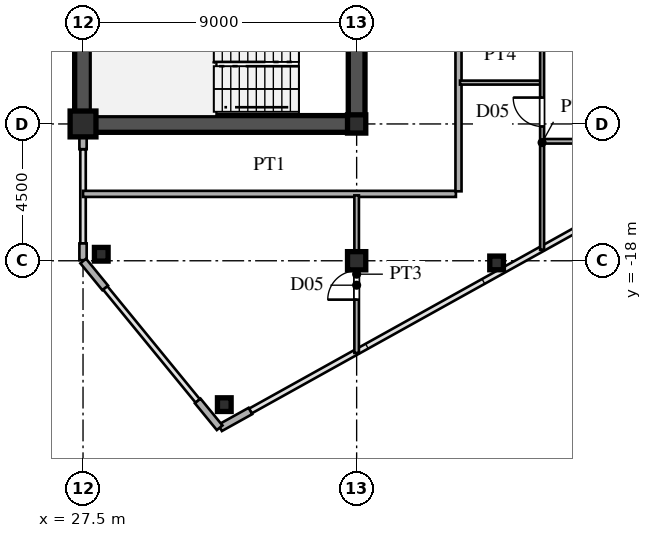
"""IFC4 building model, lengths in metres.
Left out: names, types, materials, properties, quantities, classifications, styles, units other than length and angle.
Written with IfcOpenShell. Run it as: python <this file> out.ifc"""

import sys

from ifc_helpers import new_model, si_unit, direction, frame, frame_2d, origin, origin_2d, place, context, subcontext, project, spatial, rectangle, hollow_rectangle, i_section, extrude, source, transform, mapped, element, fill, save


model = new_model("IFC4")
c1 = context("Model", 3, precision=1e-05, world=origin(), true_north=direction((0.0, 1.0)))
c2 = subcontext(c1, "Body", "Model", "MODEL_VIEW")
j1 = project(units=[si_unit("LENGTHUNIT", "METRE"), si_unit("PLANEANGLEUNIT", "RADIAN")], contexts=[c1])
p1 = place(None, origin())
s1 = spatial("IfcSite", under=j1, at=p1, CompositionType="ELEMENT")
p2 = place(p1, origin())
s2 = spatial("IfcBuilding", under=s1, at=p2, CompositionType="ELEMENT")
p3 = place(p2, frame((0.0, 0.0, 167.1)))
s3 = spatial("IfcBuildingStorey", under=s2, at=p3, CompositionType="ELEMENT", Elevation=167.1)
m1 = source(origin(), c2, "Body", "SweptSolid", [
    extrude(hollow_rectangle(XDim=0.85, YDim=0.85, WallThickness=0.036, at=origin_2d()), origin(), (0.0, 0.0, 1.0), 3.6),
])
p4 = place(p3, frame((27.5, -13.5, 0.0), z_axis=(0.0, 0.0, 1.0), x_axis=(1.0, 0.0, 0.0)))
e1 = element("IfcColumn", 1, at=p4, inside=s3, PredefinedType="COLUMN", context=c2, shape_type="MappedRepresentation", body=[
    mapped(m1, transform((0.0, 0.0, 0.0), scale=1.0)),
])
m2 = source(origin(), c2, "Body", "SweptSolid", [
    extrude(i_section(OverallWidth=0.6, OverallDepth=0.6, WebThickness=0.025, FlangeThickness=0.04, at=origin_2d()), origin(), (0.0, 0.0, 1.0), 3.6),
])
for number, where, z_axis, x_axis in (
    (2, (36.5, -18.0, 0.0), (0.0, 0.0, 1.0), (1.0, 0.0, 0.0)),
    (3, (36.5, -13.5, 0.0), (0.0, 0.0, 1.0), (1.0, 0.0, 0.0)),
):
    element("IfcColumn", number, at=place(p3, frame(where, z_axis=z_axis, x_axis=x_axis)), inside=s3, PredefinedType="COLUMN", context=c2, shape_type="MappedRepresentation", body=[
        mapped(m2, transform((0.0, 0.0, 0.0), scale=1.0)),
    ])
m3 = source(origin(), c2, "Body", "SweptSolid", [
    extrude(hollow_rectangle(XDim=0.45, YDim=0.45, WallThickness=0.018, at=origin_2d()), origin(), (0.0, 0.0, 1.0), 3.6),
])
for number, where, z_axis, x_axis in (
    (4, (32.147, -22.732, 0.0), (0.0, 0.0, 1.0), (1.0, 0.0, 0.0)),
    (5, (28.1, -17.786, 0.0), (0.0, 0.0, 1.0), (1.0, 0.0, 0.0)),
    (6, (41.104, -18.071, 0.0), (0.0, 0.0, 1.0), (1.0, 0.0, 0.0)),
):
    element("IfcColumn", number, at=place(p3, frame(where, z_axis=z_axis, x_axis=x_axis)), inside=s3, PredefinedType="COLUMN", context=c2, shape_type="MappedRepresentation", body=[
        mapped(m3, transform((0.0, 0.0, 0.0), scale=1.0)),
    ])
p5 = place(p3, frame((32.009, -23.495, 0.0), z_axis=(0.0, 0.0, 1.0), x_axis=(0.87385402111, 0.486188389196, 0.0)))
e7 = element("IfcWall", 7, at=p5, inside=s3, PredefinedType="SOLIDWALL", context=c2, shape_type="SweptSolid", body=[
    extrude(rectangle(XDim=1.14, YDim=0.24, at=frame_2d((0.57, 0.0))), origin(), (0.0, 0.0, 1.0), 3.38),
])
p6 = place(p3, frame((27.5, -17.98, 0.0), z_axis=(0.0, 0.0, 1.0), x_axis=(0.0, 1.0, 0.0)))
e8 = element("IfcWall", 8, at=p6, inside=s3, PredefinedType="SOLIDWALL", context=c2, shape_type="SweptSolid", body=[
    extrude(rectangle(XDim=0.55, YDim=0.24, at=frame_2d((0.275, 0.0))), origin(), (0.0, 0.0, 1.0), 3.38),
])
p7 = place(p3, frame((27.5, -14.33, 0.0), z_axis=(0.0, 0.0, 1.0), x_axis=(0.0, 1.0, 0.0)))
e9 = element("IfcWall", 9, at=p7, inside=s3, PredefinedType="SOLIDWALL", context=c2, shape_type="SweptSolid", body=[
    extrude(rectangle(XDim=0.55, YDim=0.24, at=frame_2d((0.275, 0.0))), origin(), (0.0, 0.0, 1.0), 2.88),
])
for number, where, z_axis, x_axis in (
    (10, (27.506, -18.008, 0.0), (0.0, 0.0, 1.0), (0.633, -0.774, 0.0)),
    (11, (31.272, -22.61, 0.0), (0.0, 0.0, 1.0), (0.633, -0.774, 0.0)),
):
    element("IfcWall", number, at=place(p3, frame(where, z_axis=z_axis, x_axis=x_axis)), inside=s3, PredefinedType="SOLIDWALL", context=c2, shape_type="SweptSolid", body=[
        extrude(rectangle(XDim=1.14, YDim=0.24, at=frame_2d((0.57, 0.0))), origin(), (0.0, 0.0, 1.0), 3.38),
    ])
p8 = place(p3, frame((27.5, -13.5, 0.0), z_axis=(0.0, 0.0, 1.0), x_axis=(0.0, 1.0, 0.0)))
e12 = element("IfcWall", 12, at=p8, inside=s3, PredefinedType="SHEAR", context=c2, shape_type="SweptSolid", body=[
    extrude(rectangle(XDim=12.2, YDim=0.55, at=frame_2d((6.1, 0.0))), origin(), (0.0, 0.0, 1.0), 3.38),
])
p9 = place(p3, frame((27.5, -13.5, 0.0), z_axis=(0.0, 0.0, 1.0), x_axis=(1.0, 0.0, 0.0)))
e13 = element("IfcWall", 13, at=p9, inside=s3, PredefinedType="SHEAR", context=c2, shape_type="SweptSolid", body=[
    extrude(rectangle(XDim=9.0, YDim=0.55, at=frame_2d((4.5, 0.0))), origin(), (0.0, 0.0, 1.0), 3.38),
])
p10 = place(p3, frame((36.5, -13.65, 0.0), z_axis=(0.0, 0.0, 1.0), x_axis=(0.0, 1.0, 0.0)))
e14 = element("IfcWall", 14, at=p10, inside=s3, PredefinedType="SHEAR", context=c2, shape_type="SweptSolid", body=[
    extrude(rectangle(XDim=7.15, YDim=0.55, at=frame_2d((3.575, 0.0))), origin(), (0.0, 0.0, 1.0), 3.38),
])
p11 = place(p10, frame((4.675, 0.0, 0.0)))
e15 = element("IfcOpeningElement", 15, at=p11, cuts=e14, PredefinedType="OPENING", context=c2, shape_type="SweptSolid", body=[
    extrude(rectangle(XDim=1.15, YDim=2.2, at=frame_2d((0.575, 1.1))), frame((0.0, 0.285, 0.0), z_axis=(0.0, -1.0, 0.0), x_axis=(1.0, 0.0, 0.0)), (0.0, 0.0, 1.0), 0.57),
])
p12 = place(p3, frame((27.5, -15.8, 0.0), z_axis=(0.0, 0.0, 1.0), x_axis=(1.0, 0.0, 0.0)))
e16 = element("IfcWall", 16, at=p12, inside=s3, PredefinedType="PARTITIONING", context=c2, shape_type="SweptSolid", body=[
    extrude(rectangle(XDim=12.265, YDim=0.2, at=frame_2d((6.132, 0.0))), origin(), (0.0, 0.0, 1.0), 3.38),
])
p13 = place(p3, frame((42.65, -14.07, 0.0), z_axis=(0.0, 0.0, 1.0), x_axis=(1.0, 0.0, 0.0)))
e17 = element("IfcWall", 17, at=p13, inside=s3, PredefinedType="PARTITIONING", context=c2, shape_type="SweptSolid", body=[
    extrude(rectangle(XDim=6.341, YDim=0.15, at=frame_2d((3.17, 0.0))), origin(), (0.0, 0.0, 1.0), 3.38),
])
p14 = place(p13, frame((3.292, 0.0, 0.0)))
e18 = element("IfcOpeningElement", 18, at=p14, cuts=e17, PredefinedType="OPENING", context=c2, shape_type="SweptSolid", body=[
    extrude(rectangle(XDim=0.95, YDim=2.15, at=frame_2d((0.475, 1.075))), frame((0.0, 0.085, 0.0), z_axis=(0.0, -1.0, 0.0), x_axis=(1.0, 0.0, 0.0)), (0.0, 0.0, 1.0), 0.17),
])
p15 = place(p3, frame((39.9, -12.14, 0.0), z_axis=(0.0, 0.0, 1.0), x_axis=(1.0, 0.0, 0.0)))
e19 = element("IfcWall", 19, at=p15, inside=s3, PredefinedType="PARTITIONING", context=c2, shape_type="SweptSolid", body=[
    extrude(rectangle(XDim=2.65, YDim=0.13, at=frame_2d((1.325, 0.0))), origin(), (0.0, 0.0, 1.0), 3.38),
])
p16 = place(p3, frame((36.5, -21.032, 0.0), z_axis=(0.0, 0.0, 1.0), x_axis=(0.0, 1.0, 0.0)))
e20 = element("IfcWall", 20, at=p16, inside=s3, PredefinedType="PARTITIONING", context=c2, shape_type="SweptSolid", body=[
    extrude(rectangle(XDim=5.182, YDim=0.15, at=frame_2d((2.591, 0.0))), origin(), (0.0, 0.0, 1.0), 2.78),
])
p17 = place(p16, frame((1.754, 0.0, 0.0)))
e21 = element("IfcOpeningElement", 21, at=p17, cuts=e20, PredefinedType="OPENING", context=c2, shape_type="SweptSolid", body=[
    extrude(rectangle(XDim=0.95, YDim=2.15, at=frame_2d((0.475, 1.075))), frame((0.0, 0.085, 0.0), z_axis=(0.0, -1.0, 0.0), x_axis=(1.0, 0.0, 0.0)), (0.0, 0.0, 1.0), 0.17),
])
p18 = place(p3, frame((39.85, -15.715, 0.0), z_axis=(0.0, 0.0, 1.0), x_axis=(0.0, 1.0, 0.0)))
e22 = element("IfcWall", 22, at=p18, inside=s3, PredefinedType="PARTITIONING", context=c2, shape_type="SweptSolid", body=[
    extrude(rectangle(XDim=31.43, YDim=0.2, at=frame_2d((15.715, 0.0))), origin(), (0.0, 0.0, 1.0), 3.38),
])
p19 = place(p18, frame((6.792, 0.0, 0.0)))
e23 = element("IfcOpeningElement", 23, at=p19, cuts=e22, PredefinedType="OPENING", context=c2, shape_type="SweptSolid", body=[
    extrude(rectangle(XDim=1.05, YDim=2.25, at=frame_2d((0.525, 1.125))), frame((0.0, 0.11, 0.0), z_axis=(0.0, -1.0, 0.0), x_axis=(1.0, 0.0, 0.0)), (0.0, 0.0, 1.0), 0.22),
])
p20 = place(p18, frame((14.98, 0.0, 0.0)))
e24 = element("IfcOpeningElement", 24, at=p20, cuts=e22, PredefinedType="OPENING", context=c2, shape_type="SweptSolid", body=[
    extrude(rectangle(XDim=1.05, YDim=2.25, at=frame_2d((0.525, 1.125))), frame((0.0, 0.11, 0.0), z_axis=(0.0, -1.0, 0.0), x_axis=(1.0, 0.0, 0.0)), (0.0, 0.0, 1.0), 0.22),
])
p21 = place(p18, frame((26.59, 0.0, 0.0)))
e25 = element("IfcOpeningElement", 25, at=p21, cuts=e22, PredefinedType="OPENING", context=c2, shape_type="SweptSolid", body=[
    extrude(rectangle(XDim=1.05, YDim=2.25, at=frame_2d((0.525, 1.125))), frame((0.0, 0.11, 0.0), z_axis=(0.0, -1.0, 0.0), x_axis=(1.0, 0.0, 0.0)), (0.0, 0.0, 1.0), 0.22),
])
p22 = place(p3, frame((42.6, -17.64, 0.0), z_axis=(0.0, 0.0, 1.0), x_axis=(0.0, 1.0, 0.0)))
e26 = element("IfcWall", 26, at=p22, inside=s3, PredefinedType="PARTITIONING", context=c2, shape_type="SweptSolid", body=[
    extrude(rectangle(XDim=7.055, YDim=0.13, at=frame_2d((3.527, 0.0))), origin(), (0.0, 0.0, 1.0), 3.38),
])
p23 = place(p22, frame((4.058, 0.0, 0.0)))
e27 = element("IfcOpeningElement", 27, at=p23, cuts=e26, PredefinedType="OPENING", context=c2, shape_type="SweptSolid", body=[
    extrude(rectangle(XDim=0.95, YDim=2.15, at=frame_2d((0.475, 1.075))), frame((0.0, 0.075, 0.0), z_axis=(0.0, -1.0, 0.0), x_axis=(1.0, 0.0, 0.0)), (0.0, 0.0, 1.0), 0.15),
])
m4 = source(origin(), c2, "Body", "SweptSolid", [
    extrude(rectangle(XDim=0.95, YDim=2.15, at=frame_2d((0.475, 1.075))), frame((0.0, 0.025, 0.0), z_axis=(0.0, -1.0, 0.0), x_axis=(1.0, 0.0, 0.0)), (0.0, 0.0, 1.0), 0.05),
])
p24 = place(p17, origin())
e28 = element("IfcDoor", 28, at=p24, inside=s3, OperationType="SINGLE_SWING_LEFT", PredefinedType="DOOR", context=c2, shape_type="MappedRepresentation", body=[
    mapped(m4, transform((0.0, 0.0, 0.0), scale=1.0)),
])
fill(e21, e28)
p25 = place(p23, origin())
e29 = element("IfcDoor", 29, at=p25, inside=s3, OperationType="SINGLE_SWING_RIGHT", PredefinedType="DOOR", context=c2, shape_type="MappedRepresentation", body=[
    mapped(m4, transform((0.0, 0.0, 0.0), scale=1.0)),
])
fill(e27, e29)
save(model, sys.argv[1])
